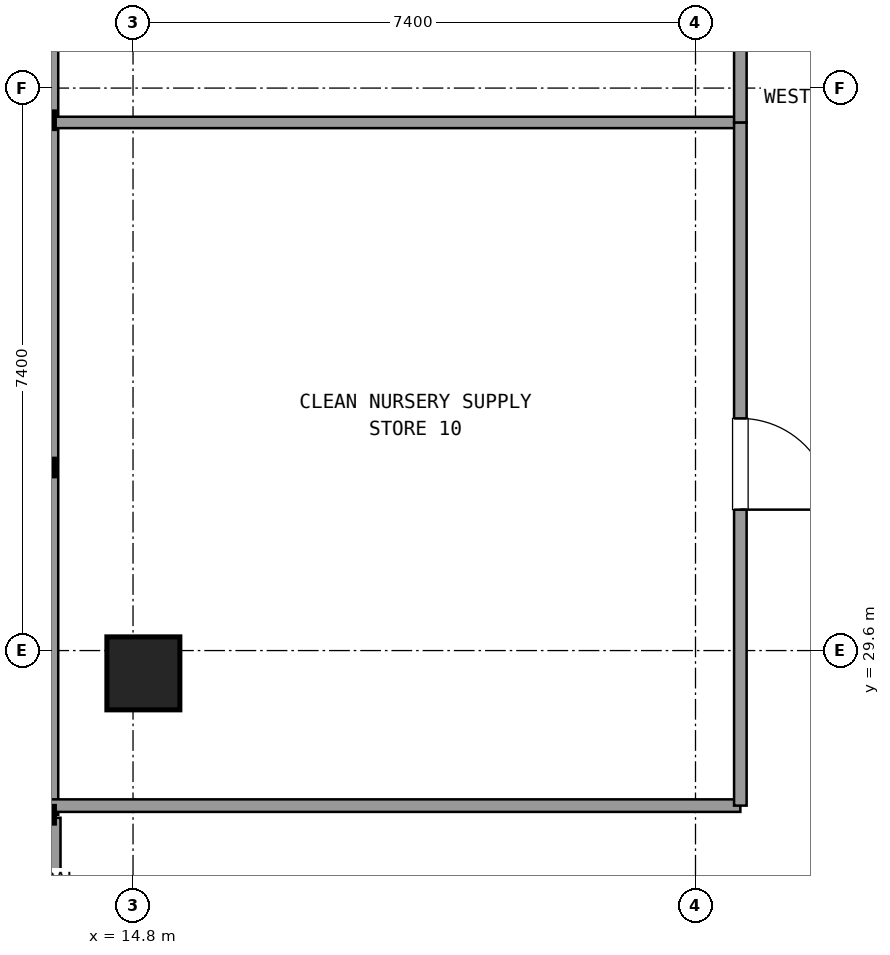
"""IFC4 building model, lengths in metres.
Left out: names, types, materials, properties, quantities, classifications, styles, units other than length and angle.
Written with IfcOpenShell. Run it as: python <this file> out.ifc"""

import sys

from ifc_helpers import new_model, si_unit, direction, frame, frame_2d, origin, origin_2d, place, context, subcontext, project, spatial, rectangle, extrude, element, fill, save


model = new_model("IFC4")
c1 = context("Model", 3, precision=1e-05, world=origin(), true_north=direction((0.0, 1.0)))
c2 = subcontext(c1, "Body", "Model", "MODEL_VIEW")
j1 = project(units=[si_unit("LENGTHUNIT", "METRE"), si_unit("PLANEANGLEUNIT", "RADIAN")], contexts=[c1])
p1 = place(None, origin())
s1 = spatial("IfcSite", under=j1, at=p1, CompositionType="ELEMENT")
p2 = place(p1, origin())
s2 = spatial("IfcBuilding", under=s1, at=p2, CompositionType="ELEMENT")
p3 = place(p2, frame((0.0, 0.0, 163.62)))
s3 = spatial("IfcBuildingStorey", under=s2, at=p3, CompositionType="ELEMENT", Elevation=163.62)
p4 = place(p3, frame((14.936, 29.3, 0.0), z_axis=(0.0, 0.0, 1.0), x_axis=(1.0, 0.0, 0.0)))
e1 = element("IfcColumn", 1, at=p4, inside=s3, PredefinedType="COLUMN", context=c2, shape_type="SweptSolid", body=[
    extrude(rectangle(XDim=0.96, YDim=0.96, at=origin_2d()), origin(), (0.0, 0.0, 1.0), 3.6),
])
p5 = place(p3, frame((13.696, 27.4, 0.0), z_axis=(0.0, 0.0, 1.0), x_axis=(0.0, -1.0, 0.0)))
e2 = element("IfcWall", 2, at=p5, inside=s3, PredefinedType="SOLIDWALL", context=c2, shape_type="SweptSolid", body=[
    extrude(rectangle(XDim=3.0, YDim=0.3, at=frame_2d((1.5, 0.0))), origin(), (0.0, 0.0, 1.0), 2.67),
])
p6 = place(p5, frame((0.9, 0.0, 0.0)))
e3 = element("IfcOpeningElement", 3, at=p6, cuts=e2, PredefinedType="OPENING", context=c2, shape_type="SweptSolid", body=[
    extrude(rectangle(XDim=1.2, YDim=2.2, at=frame_2d((0.6, 1.1))), frame((0.0, 0.16, 0.0), z_axis=(0.0, -1.0, 0.0), x_axis=(1.0, 0.0, 0.0)), (0.0, 0.0, 1.0), 0.32),
])
p7 = place(p3, frame((13.696, 41.145, 0.0), z_axis=(0.0, 0.0, 1.0), x_axis=(0.0, -1.0, 0.0)))
e4 = element("IfcWall", 4, at=p7, inside=s3, PredefinedType="SOLIDWALL", context=c2, shape_type="SweptSolid", body=[
    extrude(rectangle(XDim=13.705, YDim=0.24, at=frame_2d((6.853, 0.0))), origin(), (0.0, 0.0, 1.0), 0.85),
])
p8 = place(p3, frame((13.716, 27.56, 0.0), z_axis=(0.0, 0.0, 1.0), x_axis=(1.0, 0.0, 0.0)))
e5 = element("IfcWall", 5, at=p8, inside=s3, PredefinedType="PARTITIONING", context=c2, shape_type="SweptSolid", body=[
    extrude(rectangle(XDim=9.074, YDim=0.165, at=frame_2d((4.537, 0.0))), origin(), (0.0, 0.0, 1.0), 2.61),
])
p9 = place(p3, frame((22.79, 36.548, 0.0), z_axis=(0.0, 0.0, 1.0), x_axis=(-1.0, 0.0, 0.0)))
e6 = element("IfcWall", 6, at=p9, inside=s3, PredefinedType="PARTITIONING", context=c2, shape_type="SweptSolid", body=[
    extrude(rectangle(XDim=9.074, YDim=0.15, at=frame_2d((4.537, 0.0))), origin(), (0.0, 0.0, 1.0), 2.61),
])
p10 = place(p3, frame((22.79, 27.56, 0.0), z_axis=(0.0, 0.0, 1.0), x_axis=(0.0, 1.0, 0.0)))
e7 = element("IfcWall", 7, at=p10, inside=s3, PredefinedType="PARTITIONING", context=c2, shape_type="SweptSolid", body=[
    extrude(rectangle(XDim=8.988, YDim=0.165, at=frame_2d((4.494, 0.0))), origin(), (0.0, 0.0, 1.0), 2.61),
])
p11 = place(p10, frame((3.894, 0.0, 0.0)))
e8 = element("IfcOpeningElement", 8, at=p11, cuts=e7, PredefinedType="OPENING", context=c2, shape_type="SweptSolid", body=[
    extrude(rectangle(XDim=1.2, YDim=2.15, at=frame_2d((0.6, 1.075))), frame((0.0, 0.093, 0.0), z_axis=(0.0, -1.0, 0.0), x_axis=(1.0, 0.0, 0.0)), (0.0, 0.0, 1.0), 0.185),
])
p12 = place(p3, frame((22.79, 36.548, 0.0), z_axis=(0.0, 0.0, 1.0), x_axis=(0.0, 1.0, 0.0)))
e9 = element("IfcWall", 9, at=p12, inside=s3, PredefinedType="PARTITIONING", context=c2, shape_type="SweptSolid", body=[
    extrude(rectangle(XDim=10.552, YDim=0.165, at=frame_2d((5.276, 0.0))), origin(), (0.0, 0.0, 1.0), 2.61),
])
p13 = place(p12, frame((4.676, 0.0, 0.0)))
e10 = element("IfcOpeningElement", 10, at=p13, cuts=e9, PredefinedType="OPENING", context=c2, shape_type="SweptSolid", body=[
    extrude(rectangle(XDim=1.2, YDim=2.15, at=frame_2d((0.6, 1.075))), frame((0.0, 0.093, 0.0), z_axis=(0.0, -1.0, 0.0), x_axis=(1.0, 0.0, 0.0)), (0.0, 0.0, 1.0), 0.185),
])
p14 = place(p11, frame((1.2, 0.0, 0.0), z_axis=(0.0, 0.0, 1.0), x_axis=(-1.0, 0.0, 0.0)))
e11 = element("IfcDoor", 11, at=p14, inside=s3, OperationType="SINGLE_SWING_LEFT", PredefinedType="DOOR", context=c2, shape_type="SweptSolid", body=[
    extrude(rectangle(XDim=1.2, YDim=2.15, at=frame_2d((0.6, 1.075))), frame((0.0, 0.025, 0.0), z_axis=(0.0, -1.0, 0.0), x_axis=(1.0, 0.0, 0.0)), (0.0, 0.0, 1.0), 0.05),
])
fill(e8, e11)
save(model, sys.argv[1])
